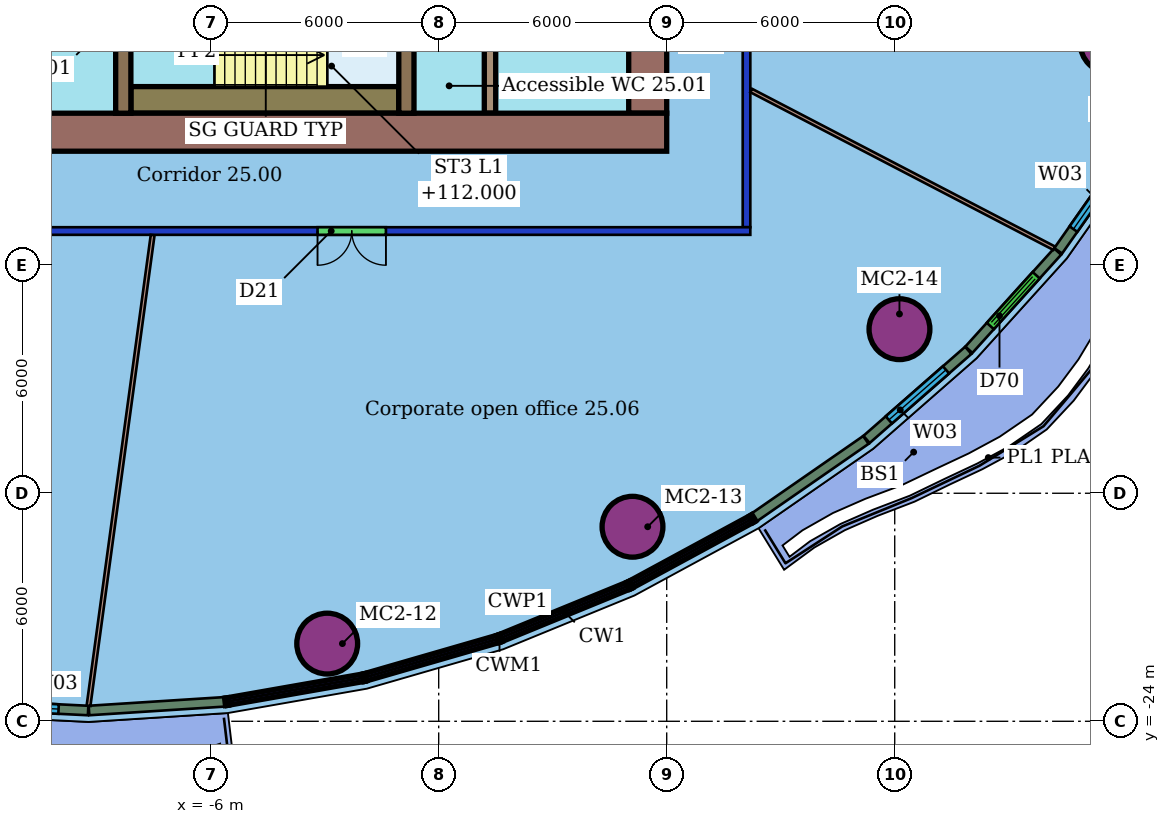
"""IFC4 building model, lengths in metres.
Left out: names, types, materials, properties, quantities, classifications, styles, units other than length and angle.
Written with IfcOpenShell. Run it as: python <this file> out.ifc"""

import sys

from ifc_helpers import new_model, si_unit, direction, frame, frame_2d, origin, origin_2d, place, context, subcontext, project, spatial, rectangle, hollow_circle, extrude, element, fill, save


model = new_model("IFC4")
c1 = context("Model", 3, precision=1e-05, world=origin(), true_north=direction((0.0, 1.0)))
c2 = subcontext(c1, "Body", "Model", "MODEL_VIEW")
j1 = project(units=[si_unit("LENGTHUNIT", "METRE"), si_unit("PLANEANGLEUNIT", "RADIAN")], contexts=[c1])
p1 = place(None, origin())
s1 = spatial("IfcSite", under=j1, at=p1, CompositionType="ELEMENT")
p2 = place(p1, origin())
s2 = spatial("IfcBuilding", under=s1, at=p2, CompositionType="ELEMENT")
p3 = place(p2, frame((0.0, 0.0, 110.2)))
s3 = spatial("IfcBuildingStorey", under=s2, at=p3, CompositionType="ELEMENT", Elevation=110.2)
for number, where, z_axis, x_axis in (
    (1, (-2.934, -21.956, 0.0), (0.0, 0.0, 1.0), (1.0, 0.0, 0.0)),
    (2, (5.1, -18.881, 0.0), (0.0, 0.0, 1.0), (1.0, 0.0, 0.0)),
    (3, (12.125, -13.683, 0.0), (0.0, 0.0, 1.0), (1.0, 0.0, 0.0)),
    (4, (17.679, -6.146, 0.0), (0.0, 0.0, 1.0), (1.0, 0.0, 0.0)),
):
    element("IfcColumn", number, at=place(p3, frame(where, z_axis=z_axis, x_axis=x_axis)), inside=s3, PredefinedType="COLUMN", context=c2, shape_type="SweptSolid", body=[
        extrude(hollow_circle(Radius=0.8, WallThickness=0.055, at=origin_2d()), origin(), (0.0, 0.0, 1.0), 3.45),
    ])
p4 = place(p3, frame((8.2, -11.1, 0.0), z_axis=(0.0, 0.0, 1.0), x_axis=(-1.0, 0.0, 0.0)))
e5 = element("IfcWall", 5, at=p4, inside=s3, PredefinedType="PARTITIONING", context=c2, shape_type="SweptSolid", body=[
    extrude(rectangle(XDim=28.4, YDim=0.2, at=frame_2d((14.2, 0.0))), origin(), (0.0, 0.0, 1.0), 3.0),
])
p5 = place(p4, frame((19.148, 0.0, 0.0)))
e6 = element("IfcOpeningElement", 6, at=p5, cuts=e5, PredefinedType="OPENING", context=c2, shape_type="SweptSolid", body=[
    extrude(rectangle(XDim=1.8, YDim=2.1, at=frame_2d((0.9, 1.05))), frame((0.0, 0.11, 0.0), z_axis=(0.0, -1.0, 0.0), x_axis=(1.0, 0.0, 0.0)), (0.0, 0.0, 1.0), 0.22),
])
p6 = place(p4, frame((9.588, 0.0, 0.0)))
e7 = element("IfcOpeningElement", 7, at=p6, cuts=e5, PredefinedType="OPENING", context=c2, shape_type="SweptSolid", body=[
    extrude(rectangle(XDim=1.8, YDim=2.1, at=frame_2d((0.9, 1.05))), frame((0.0, 0.11, 0.0), z_axis=(0.0, -1.0, 0.0), x_axis=(1.0, 0.0, 0.0)), (0.0, 0.0, 1.0), 0.22),
])
p7 = place(p3, frame((8.1, 11.0, 0.0), z_axis=(0.0, 0.0, 1.0), x_axis=(0.0, -1.0, 0.0)))
e8 = element("IfcWall", 8, at=p7, inside=s3, PredefinedType="PARTITIONING", context=c2, shape_type="SweptSolid", body=[
    extrude(rectangle(XDim=22.0, YDim=0.2, at=frame_2d((11.0, 0.0))), origin(), (0.0, 0.0, 1.0), 3.0),
])
p8 = place(p7, frame((10.526, 0.0, 0.0)))
e9 = element("IfcOpeningElement", 9, at=p8, cuts=e8, PredefinedType="OPENING", context=c2, shape_type="SweptSolid", body=[
    extrude(rectangle(XDim=1.8, YDim=2.1, at=frame_2d((0.9, 1.05))), frame((0.0, 0.11, 0.0), z_axis=(0.0, -1.0, 0.0), x_axis=(1.0, 0.0, 0.0)), (0.0, 0.0, 1.0), 0.22),
])
p9 = place(p7, frame((3.909, 0.0, 0.0)))
e10 = element("IfcOpeningElement", 10, at=p9, cuts=e8, PredefinedType="OPENING", context=c2, shape_type="SweptSolid", body=[
    extrude(rectangle(XDim=1.8, YDim=2.1, at=frame_2d((0.9, 1.05))), frame((0.0, 0.11, 0.0), z_axis=(0.0, -1.0, 0.0), x_axis=(1.0, 0.0, 0.0)), (0.0, 0.0, 1.0), 0.22),
])
p10 = place(p3, frame((-9.215, -23.592, 0.0), z_axis=(0.0, 0.0, 1.0), x_axis=(0.13500338244, 0.990845137612, 0.0)))
e11 = element("IfcWall", 11, at=p10, inside=s3, PredefinedType="PARTITIONING", context=c2, shape_type="SweptSolid", body=[
    extrude(rectangle(XDim=12.5, YDim=0.1, at=frame_2d((6.25, 0.0))), origin(), (0.0, 0.0, 1.0), 3.45),
])
p11 = place(p3, frame((16.197, -11.553, 0.0), z_axis=(0.0, 0.0, 1.0), x_axis=(-0.887035297642, 0.461701614398, 0.0)))
e12 = element("IfcWall", 12, at=p11, inside=s3, PredefinedType="PARTITIONING", context=c2, shape_type="SweptSolid", body=[
    extrude(rectangle(XDim=8.989, YDim=0.1, at=frame_2d((4.494, 0.0))), origin(), (0.0, 0.0, 1.0), 3.45),
])
p12 = place(p3, frame((-12.778, -23.542, 0.0), z_axis=(0.0, 0.0, 1.0), x_axis=(0.998802311513, -0.048927931852, 0.0)))
e13 = element("IfcWall", 13, at=p12, inside=s3, PredefinedType="SOLIDWALL", context=c2, shape_type="SweptSolid", body=[
    extrude(rectangle(XDim=3.558, YDim=0.25, at=frame_2d((1.779, 0.0))), origin(), (0.0, 0.0, 1.0), 3.05),
])
p13 = place(p12, frame((0.779, 0.0, 0.9)))
e14 = element("IfcOpeningElement", 14, at=p13, cuts=e13, PredefinedType="OPENING", context=c2, shape_type="SweptSolid", body=[
    extrude(rectangle(XDim=2.0, YDim=2.1, at=frame_2d((1.0, 1.05))), frame((0.0, 0.135, 0.0), z_axis=(0.0, -1.0, 0.0), x_axis=(1.0, 0.0, 0.0)), (0.0, 0.0, 1.0), 0.27),
])
p14 = place(p3, frame((-9.203, -23.716, 0.0), z_axis=(0.0, 0.0, 1.0), x_axis=(0.997966032013, 0.063747932895, 0.0)))
e15 = element("IfcWall", 15, at=p14, inside=s3, PredefinedType="SOLIDWALL", context=c2, shape_type="SweptSolid", body=[
    extrude(rectangle(XDim=3.573, YDim=0.25, at=frame_2d((1.787, 0.0))), origin(), (0.0, 0.0, 1.0), 3.05),
])
p15 = place(p3, frame((8.305, -18.633, 0.0), z_axis=(0.0, 0.0, 1.0), x_axis=(0.821702391874, 0.56991681778, 0.0)))
e16 = element("IfcWall", 16, at=p15, inside=s3, PredefinedType="SOLIDWALL", context=c2, shape_type="SweptSolid", body=[
    extrude(rectangle(XDim=3.573, YDim=0.25, at=frame_2d((1.787, 0.0))), origin(), (0.0, 0.0, 1.0), 3.05),
])
p16 = place(p3, frame((11.259, -16.583, 0.0), z_axis=(0.0, 0.0, 1.0), x_axis=(0.752389619374, 0.658718346988, 0.0)))
e17 = element("IfcWall", 17, at=p16, inside=s3, PredefinedType="SOLIDWALL", context=c2, shape_type="SweptSolid", body=[
    extrude(rectangle(XDim=3.558, YDim=0.25, at=frame_2d((1.779, 0.0))), origin(), (0.0, 0.0, 1.0), 3.05),
])
p17 = place(p16, frame((0.779, 0.0, 0.9)))
e18 = element("IfcOpeningElement", 18, at=p17, cuts=e17, PredefinedType="OPENING", context=c2, shape_type="SweptSolid", body=[
    extrude(rectangle(XDim=2.0, YDim=2.1, at=frame_2d((1.0, 1.05))), frame((0.0, 0.135, 0.0), z_axis=(0.0, -1.0, 0.0), x_axis=(1.0, 0.0, 0.0)), (0.0, 0.0, 1.0), 0.27),
])
p18 = place(p3, frame((13.951, -14.224, 0.0), z_axis=(0.0, 0.0, 1.0), x_axis=(0.670380889725, 0.74201715795, 0.0)))
e19 = element("IfcWall", 19, at=p18, inside=s3, PredefinedType="SOLIDWALL", context=c2, shape_type="SweptSolid", body=[
    extrude(rectangle(XDim=3.483, YDim=0.25, at=frame_2d((1.742, 0.0))), origin(), (0.0, 0.0, 1.0), 3.05),
])
p19 = place(p18, frame((0.842, 0.0, 0.0)))
e20 = element("IfcOpeningElement", 20, at=p19, cuts=e19, PredefinedType="OPENING", context=c2, shape_type="SweptSolid", body=[
    extrude(rectangle(XDim=1.8, YDim=2.4, at=frame_2d((0.9, 1.2))), frame((0.0, 0.135, 0.0), z_axis=(0.0, -1.0, 0.0), x_axis=(1.0, 0.0, 0.0)), (0.0, 0.0, 1.0), 0.27),
])
p20 = place(p3, frame((16.301, -11.622, 0.0), z_axis=(0.0, 0.0, 1.0), x_axis=(0.57497541368, 0.818170687365, 0.0)))
e21 = element("IfcWall", 21, at=p20, inside=s3, PredefinedType="SOLIDWALL", context=c2, shape_type="SweptSolid", body=[
    extrude(rectangle(XDim=3.398, YDim=0.25, at=frame_2d((1.699, 0.0))), origin(), (0.0, 0.0, 1.0), 3.05),
])
p21 = place(p20, frame((0.699, 0.0, 0.9)))
e22 = element("IfcOpeningElement", 22, at=p21, cuts=e21, PredefinedType="OPENING", context=c2, shape_type="SweptSolid", body=[
    extrude(rectangle(XDim=2.0, YDim=2.1, at=frame_2d((1.0, 1.05))), frame((0.0, 0.135, 0.0), z_axis=(0.0, -1.0, 0.0), x_axis=(1.0, 0.0, 0.0)), (0.0, 0.0, 1.0), 0.27),
])
p22 = place(p3, frame((-18.0, -8.5, 0.0), z_axis=(0.0, 0.0, 1.0), x_axis=(1.0, 0.0, 0.0)))
e23 = element("IfcWall", 23, at=p22, inside=s3, PredefinedType="SHEAR", context=c2, shape_type="SweptSolid", body=[
    extrude(rectangle(XDim=24.0, YDim=1.0, at=frame_2d((12.0, 0.0))), origin(), (0.0, 0.0, 1.0), 3.3),
])
p23 = place(p22, frame((6.0, 0.0, 0.0)))
e24 = element("IfcOpeningElement", 24, at=p23, cuts=e23, PredefinedType="OPENING", context=c2, shape_type="SweptSolid", body=[
    extrude(rectangle(XDim=1.2, YDim=2.1, at=frame_2d((0.6, 1.05))), frame((0.0, 0.51, 0.0), z_axis=(0.0, -1.0, 0.0), x_axis=(1.0, 0.0, 0.0)), (0.0, 0.0, 1.0), 1.02),
])
p24 = place(p3, frame((5.5, -8.0, 0.0), z_axis=(0.0, 0.0, 1.0), x_axis=(0.0, 1.0, 0.0)))
e25 = element("IfcWall", 25, at=p24, inside=s3, PredefinedType="SHEAR", context=c2, shape_type="SweptSolid", body=[
    extrude(rectangle(XDim=16.0, YDim=1.0, at=frame_2d((8.0, 0.0))), origin(), (0.0, 0.0, 1.0), 3.3),
])
p25 = place(p24, frame((2.9, 0.0, 0.0)))
e26 = element("IfcOpeningElement", 26, at=p25, cuts=e25, PredefinedType="OPENING", context=c2, shape_type="SweptSolid", body=[
    extrude(rectangle(XDim=1.2, YDim=2.1, at=frame_2d((0.6, 1.05))), frame((0.0, 0.51, 0.0), z_axis=(0.0, -1.0, 0.0), x_axis=(1.0, 0.0, 0.0)), (0.0, 0.0, 1.0), 1.02),
])
p26 = place(p24, frame((11.9, 0.0, 0.0)))
e27 = element("IfcOpeningElement", 27, at=p26, cuts=e25, PredefinedType="OPENING", context=c2, shape_type="SweptSolid", body=[
    extrude(rectangle(XDim=1.2, YDim=2.1, at=frame_2d((0.6, 1.05))), frame((0.0, 0.51, 0.0), z_axis=(0.0, -1.0, 0.0), x_axis=(1.0, 0.0, 0.0)), (0.0, 0.0, 1.0), 1.02),
])
p27 = place(p3, frame((1.35, -8.0, 0.0), z_axis=(0.0, 0.0, 1.0), x_axis=(0.0, 1.0, 0.0)))
e28 = element("IfcWall", 28, at=p27, inside=s3, PredefinedType="SHEAR", context=c2, shape_type="SweptSolid", body=[
    extrude(rectangle(XDim=16.0, YDim=0.3, at=frame_2d((8.0, 0.0))), origin(), (0.0, 0.0, 1.0), 3.3),
])
p28 = place(p27, frame((1.91, 0.0, 0.0)))
e29 = element("IfcOpeningElement", 29, at=p28, cuts=e28, PredefinedType="OPENING", context=c2, shape_type="SweptSolid", body=[
    extrude(rectangle(XDim=1.0, YDim=2.1, at=frame_2d((0.5, 1.05))), frame((0.0, 0.16, 0.0), z_axis=(0.0, -1.0, 0.0), x_axis=(1.0, 0.0, 0.0)), (0.0, 0.0, 1.0), 0.32),
])
p29 = place(p27, frame((7.25, 0.0, 0.0)))
e30 = element("IfcOpeningElement", 30, at=p29, cuts=e28, PredefinedType="OPENING", context=c2, shape_type="SweptSolid", body=[
    extrude(rectangle(XDim=1.5, YDim=2.1, at=frame_2d((0.75, 1.05))), frame((0.0, 0.16, 0.0), z_axis=(0.0, -1.0, 0.0), x_axis=(1.0, 0.0, 0.0)), (0.0, 0.0, 1.0), 0.32),
])
p30 = place(p3, frame((-8.3, -3.88, 0.0), z_axis=(0.0, 0.0, 1.0), x_axis=(0.0, -1.0, 0.0)))
e31 = element("IfcWall", 31, at=p30, inside=s3, PredefinedType="SHEAR", context=c2, shape_type="SweptSolid", body=[
    extrude(rectangle(XDim=4.12, YDim=0.4, at=frame_2d((2.06, 0.0))), origin(), (0.0, 0.0, 1.0), 3.3),
])
p31 = place(p30, frame((1.11, 0.0, 0.0)))
e32 = element("IfcOpeningElement", 32, at=p31, cuts=e31, PredefinedType="OPENING", context=c2, shape_type="SweptSolid", body=[
    extrude(rectangle(XDim=1.2, YDim=2.1, at=frame_2d((0.6, 1.05))), frame((0.0, 0.21, 0.0), z_axis=(0.0, -1.0, 0.0), x_axis=(1.0, 0.0, 0.0)), (0.0, 0.0, 1.0), 0.42),
])
p32 = place(p3, frame((-0.85, -3.88, 0.0), z_axis=(0.0, 0.0, 1.0), x_axis=(0.0, -1.0, 0.0)))
e33 = element("IfcWall", 33, at=p32, inside=s3, PredefinedType="SHEAR", context=c2, shape_type="SweptSolid", body=[
    extrude(rectangle(XDim=4.12, YDim=0.4, at=frame_2d((2.06, 0.0))), origin(), (0.0, 0.0, 1.0), 3.3),
])
p33 = place(p3, frame((-8.1, -7.65, 0.0), z_axis=(0.0, 0.0, 1.0), x_axis=(1.0, 0.0, 0.0)))
e34 = element("IfcWall", 34, at=p33, inside=s3, PredefinedType="SHEAR", context=c2, shape_type="SweptSolid", body=[
    extrude(rectangle(XDim=7.05, YDim=0.7, at=frame_2d((3.525, 0.0))), origin(), (0.0, 0.0, 1.0), 3.3),
])
p34 = place(p6, origin())
e35 = element("IfcDoor", 35, at=p34, inside=s3, OperationType="DOUBLE_DOOR_SINGLE_SWING", PredefinedType="DOOR", context=c2, shape_type="SweptSolid", body=[
    extrude(rectangle(XDim=1.8, YDim=2.1, at=frame_2d((0.9, 1.05))), frame((0.0, 0.025, 0.0), z_axis=(0.0, -1.0, 0.0), x_axis=(1.0, 0.0, 0.0)), (0.0, 0.0, 1.0), 0.05),
])
fill(e7, e35)
p35 = place(p13, origin())
e36 = element("IfcWindow", 36, at=p35, inside=s3, PartitioningType="SINGLE_PANEL", PredefinedType="WINDOW", context=c2, shape_type="SweptSolid", body=[
    extrude(rectangle(XDim=2.0, YDim=2.1, at=frame_2d((1.0, 1.05))), frame((0.0, 0.03, 0.0), z_axis=(0.0, -1.0, 0.0), x_axis=(1.0, 0.0, 0.0)), (0.0, 0.0, 1.0), 0.06),
])
fill(e14, e36)
p36 = place(p17, origin())
e37 = element("IfcWindow", 37, at=p36, inside=s3, PartitioningType="SINGLE_PANEL", PredefinedType="WINDOW", context=c2, shape_type="SweptSolid", body=[
    extrude(rectangle(XDim=2.0, YDim=2.1, at=frame_2d((1.0, 1.05))), frame((0.0, 0.03, 0.0), z_axis=(0.0, -1.0, 0.0), x_axis=(1.0, 0.0, 0.0)), (0.0, 0.0, 1.0), 0.06),
])
fill(e18, e37)
p37 = place(p19, origin())
e38 = element("IfcDoor", 38, at=p37, inside=s3, OperationType="DOUBLE_DOOR_SLIDING", PredefinedType="DOOR", context=c2, shape_type="SweptSolid", body=[
    extrude(rectangle(XDim=1.8, YDim=2.4, at=frame_2d((0.9, 1.2))), frame((0.0, 0.025, 0.0), z_axis=(0.0, -1.0, 0.0), x_axis=(1.0, 0.0, 0.0)), (0.0, 0.0, 1.0), 0.05),
])
fill(e20, e38)
p38 = place(p21, origin())
e39 = element("IfcWindow", 39, at=p38, inside=s3, PartitioningType="SINGLE_PANEL", PredefinedType="WINDOW", context=c2, shape_type="SweptSolid", body=[
    extrude(rectangle(XDim=2.0, YDim=2.1, at=frame_2d((1.0, 1.05))), frame((0.0, 0.03, 0.0), z_axis=(0.0, -1.0, 0.0), x_axis=(1.0, 0.0, 0.0)), (0.0, 0.0, 1.0), 0.06),
])
fill(e22, e39)
save(model, sys.argv[1])
